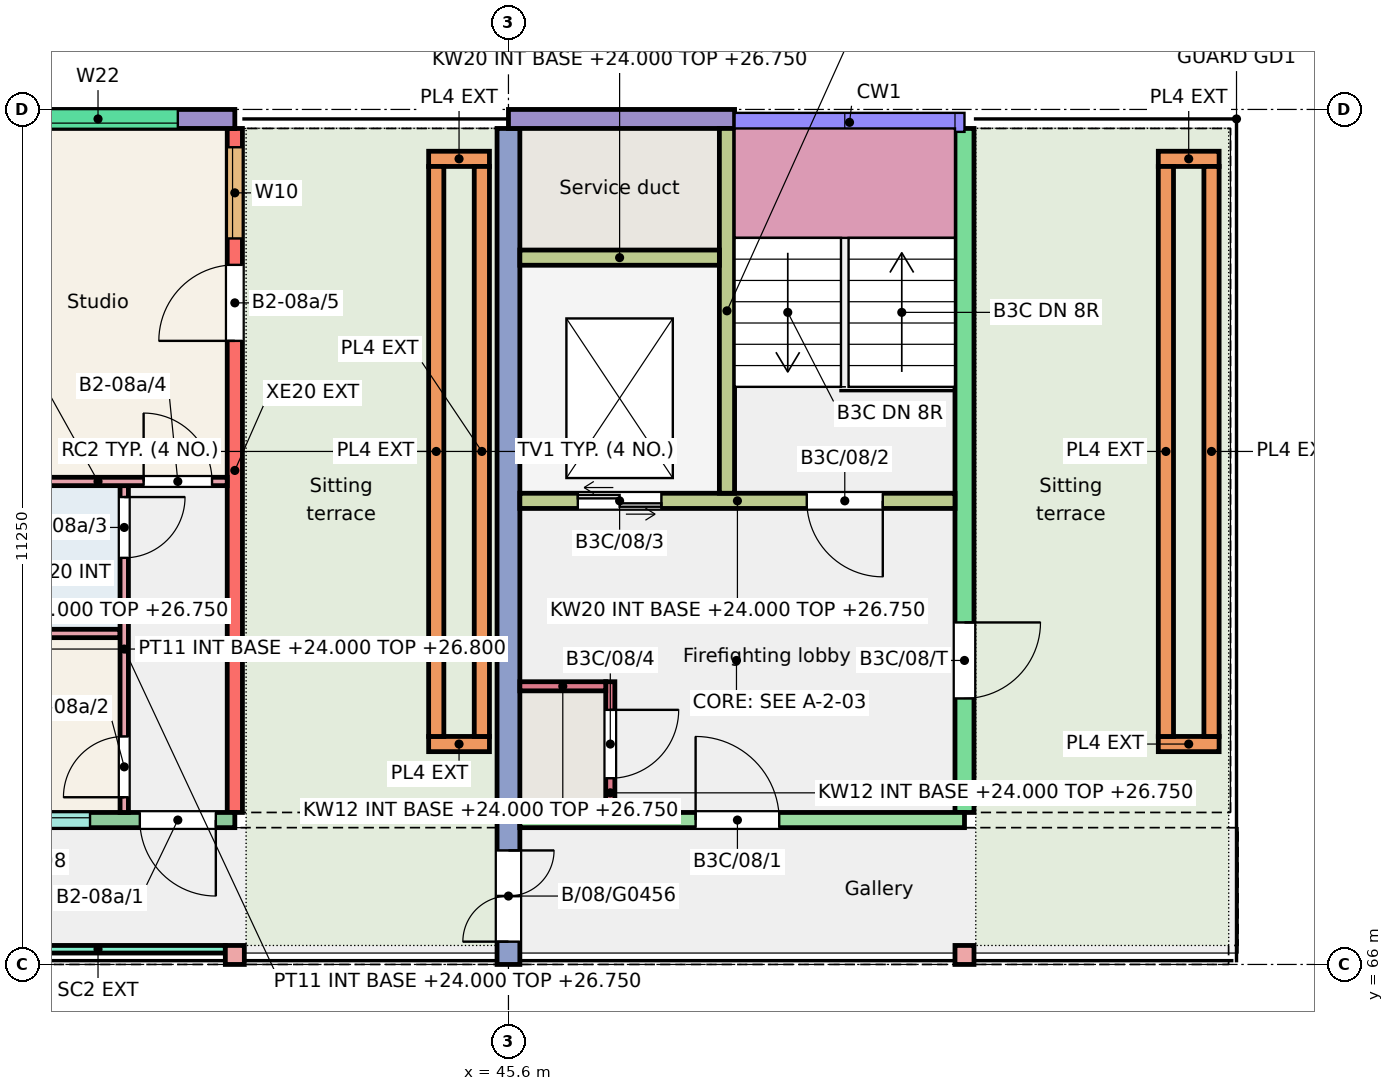
"""IFC4 building model, lengths in metres.
Left out: names, types, materials, properties, quantities, classifications, styles, units other than length and angle.
Written with IfcOpenShell. Run it as: python <this file> out.ifc"""

import sys

from ifc_helpers import new_model, si_unit, direction, frame, frame_2d, origin, origin_2d, place, context, subcontext, project, spatial, rectangle, extrude, element, fill, save


model = new_model("IFC4")
c1 = context("Model", 3, precision=1e-05, world=origin(), true_north=direction((0.0, 1.0)))
c2 = subcontext(c1, "Body", "Model", "MODEL_VIEW")
j1 = project(units=[si_unit("LENGTHUNIT", "METRE"), si_unit("PLANEANGLEUNIT", "RADIAN")], contexts=[c1])
p1 = place(None, origin())
s1 = spatial("IfcSite", under=j1, at=p1, CompositionType="ELEMENT")
p2 = place(p1, origin())
s2 = spatial("IfcBuilding", under=s1, at=p2, CompositionType="ELEMENT")
p3 = place(p2, frame((0.0, 0.0, 24.0)))
s3 = spatial("IfcBuildingStorey", under=s2, at=p3, CompositionType="ELEMENT", Elevation=24.0)
p4 = place(p3, frame((42.0, 68.0, 0.0), z_axis=(0.0, 0.0, 1.0), x_axis=(0.0, 1.0, 0.0)))
e1 = element("IfcWall", 1, at=p4, inside=s3, PredefinedType="SHEAR", context=c2, shape_type="SweptSolid", body=[
    extrude(rectangle(XDim=9.0, YDim=0.2, at=frame_2d((4.5, 0.0))), origin(), (0.0, 0.0, 1.0), 3.0),
])
p5 = place(p4, frame((7.552, 0.0, 0.9)))
e2 = element("IfcOpeningElement", 2, at=p5, cuts=e1, PredefinedType="OPENING", context=c2, shape_type="SweptSolid", body=[
    extrude(rectangle(XDim=1.2, YDim=1.5, at=frame_2d((0.6, 0.75))), frame((0.0, 0.11, 0.0), z_axis=(0.0, -1.0, 0.0), x_axis=(1.0, 0.0, 0.0)), (0.0, 0.0, 1.0), 0.22),
])
p6 = place(p4, frame((6.205, 0.0, 0.0)))
e3 = element("IfcOpeningElement", 3, at=p6, cuts=e1, PredefinedType="OPENING", context=c2, shape_type="SweptSolid", body=[
    extrude(rectangle(XDim=1.0, YDim=2.1, at=frame_2d((0.5, 1.05))), frame((0.0, 0.11, 0.0), z_axis=(0.0, -1.0, 0.0), x_axis=(1.0, 0.0, 0.0)), (0.0, 0.0, 1.0), 0.22),
])
p7 = place(p3, frame((45.6, 66.0, 0.0), z_axis=(0.0, 0.0, 1.0), x_axis=(0.0, 1.0, 0.0)))
e4 = element("IfcWall", 4, at=p7, inside=s3, PredefinedType="SHEAR", context=c2, shape_type="SweptSolid", body=[
    extrude(rectangle(XDim=11.0, YDim=0.3, at=frame_2d((5.5, 0.0))), origin(), (0.0, 0.0, 1.0), 3.0),
])
p8 = place(p7, frame((0.3, 0.0, 0.0)))
e5 = element("IfcOpeningElement", 5, at=p8, cuts=e4, PredefinedType="OPENING", context=c2, shape_type="SweptSolid", body=[
    extrude(rectangle(XDim=1.2, YDim=2.1, at=frame_2d((0.6, 1.05))), frame((0.0, 0.16, 0.0), z_axis=(0.0, -1.0, 0.0), x_axis=(1.0, 0.0, 0.0)), (0.0, 0.0, 1.0), 0.32),
])
p9 = place(p3, frame((51.6, 68.0, 0.0), z_axis=(0.0, 0.0, 1.0), x_axis=(0.0, 1.0, 0.0)))
e6 = element("IfcWall", 6, at=p9, inside=s3, PredefinedType="SHEAR", context=c2, shape_type="SweptSolid", body=[
    extrude(rectangle(XDim=9.0, YDim=0.25, at=frame_2d((4.5, 0.0))), origin(), (0.0, 0.0, 1.0), 3.0),
])
p10 = place(p9, frame((1.5, 0.0, 0.0)))
e7 = element("IfcOpeningElement", 7, at=p10, cuts=e6, PredefinedType="OPENING", context=c2, shape_type="SweptSolid", body=[
    extrude(rectangle(XDim=1.0, YDim=2.1, at=frame_2d((0.5, 1.05))), frame((0.0, 0.135, 0.0), z_axis=(0.0, -1.0, 0.0), x_axis=(1.0, 0.0, 0.0)), (0.0, 0.0, 1.0), 0.27),
])
p11 = place(p3, frame((38.4, 77.125, 0.0), z_axis=(0.0, 0.0, 1.0), x_axis=(1.0, 0.0, 0.0)))
e8 = element("IfcWall", 8, at=p11, inside=s3, PredefinedType="SOLIDWALL", context=c2, shape_type="SweptSolid", body=[
    extrude(rectangle(XDim=3.6, YDim=0.25, at=frame_2d((1.8, 0.0))), origin(), (0.0, 0.0, 1.0), 3.0),
])
p12 = place(p11, frame((0.75, 0.0, 1.2)))
e9 = element("IfcOpeningElement", 9, at=p12, cuts=e8, PredefinedType="OPENING", context=c2, shape_type="SweptSolid", body=[
    extrude(rectangle(XDim=2.1, YDim=1.2, at=frame_2d((1.05, 0.6))), frame((0.0, 0.135, 0.0), z_axis=(0.0, -1.0, 0.0), x_axis=(1.0, 0.0, 0.0)), (0.0, 0.0, 1.0), 0.27),
])
p13 = place(p3, frame((38.4, 67.9, 0.0), z_axis=(0.0, 0.0, 1.0), x_axis=(1.0, 0.0, 0.0)))
e10 = element("IfcWall", 10, at=p13, inside=s3, PredefinedType="SOLIDWALL", context=c2, shape_type="SweptSolid", body=[
    extrude(rectangle(XDim=3.6, YDim=0.2, at=frame_2d((1.8, 0.0))), origin(), (0.0, 0.0, 1.0), 3.0),
])
p14 = place(p13, frame((0.495, 0.0, 1.1)))
e11 = element("IfcOpeningElement", 11, at=p14, cuts=e10, PredefinedType="OPENING", context=c2, shape_type="SweptSolid", body=[
    extrude(rectangle(XDim=1.2, YDim=1.3, at=frame_2d((0.6, 0.65))), frame((0.0, 0.11, 0.0), z_axis=(0.0, -1.0, 0.0), x_axis=(1.0, 0.0, 0.0)), (0.0, 0.0, 1.0), 0.22),
])
p15 = place(p13, frame((2.35, 0.0, 0.0)))
e12 = element("IfcOpeningElement", 12, at=p15, cuts=e10, PredefinedType="OPENING", context=c2, shape_type="SweptSolid", body=[
    extrude(rectangle(XDim=1.0, YDim=2.1, at=frame_2d((0.5, 1.05))), frame((0.0, 0.11, 0.0), z_axis=(0.0, -1.0, 0.0), x_axis=(1.0, 0.0, 0.0)), (0.0, 0.0, 1.0), 0.22),
])
p16 = place(p3, frame((45.6, 77.125, 0.0), z_axis=(0.0, 0.0, 1.0), x_axis=(1.0, 0.0, 0.0)))
e13 = element("IfcWall", 13, at=p16, inside=s3, PredefinedType="SOLIDWALL", context=c2, shape_type="SweptSolid", body=[
    extrude(rectangle(XDim=2.975, YDim=0.25, at=frame_2d((1.487, 0.0))), origin(), (0.0, 0.0, 1.0), 3.0),
])
p17 = place(p3, frame((45.75, 67.9, 0.0), z_axis=(0.0, 0.0, 1.0), x_axis=(1.0, 0.0, 0.0)))
e14 = element("IfcWall", 14, at=p17, inside=s3, PredefinedType="SHEAR", context=c2, shape_type="SweptSolid", body=[
    extrude(rectangle(XDim=5.85, YDim=0.2, at=frame_2d((2.925, 0.0))), origin(), (0.0, 0.0, 1.0), 2.75),
])
p18 = place(p17, frame((2.312, 0.0, 0.0)))
e15 = element("IfcOpeningElement", 15, at=p18, cuts=e14, PredefinedType="OPENING", context=c2, shape_type="SweptSolid", body=[
    extrude(rectangle(XDim=1.1, YDim=2.1, at=frame_2d((0.55, 1.05))), frame((0.0, 0.11, 0.0), z_axis=(0.0, -1.0, 0.0), x_axis=(1.0, 0.0, 0.0)), (0.0, 0.0, 1.0), 0.22),
])
p19 = place(p3, frame((45.75, 72.1, 0.0), z_axis=(0.0, 0.0, 1.0), x_axis=(1.0, 0.0, 0.0)))
e16 = element("IfcWall", 16, at=p19, inside=s3, PredefinedType="SHEAR", context=c2, shape_type="SweptSolid", body=[
    extrude(rectangle(XDim=5.725, YDim=0.2, at=frame_2d((2.863, 0.0))), origin(), (0.0, 0.0, 1.0), 2.75),
])
p20 = place(p19, frame((3.775, 0.0, 0.0)))
e17 = element("IfcOpeningElement", 17, at=p20, cuts=e16, PredefinedType="OPENING", context=c2, shape_type="SweptSolid", body=[
    extrude(rectangle(XDim=1.0, YDim=2.1, at=frame_2d((0.5, 1.05))), frame((0.0, 0.11, 0.0), z_axis=(0.0, -1.0, 0.0), x_axis=(1.0, 0.0, 0.0)), (0.0, 0.0, 1.0), 0.22),
])
p21 = place(p19, frame((0.762, 0.0, 0.0)))
e18 = element("IfcOpeningElement", 18, at=p21, cuts=e16, PredefinedType="OPENING", context=c2, shape_type="SweptSolid", body=[
    extrude(rectangle(XDim=1.1, YDim=2.1, at=frame_2d((0.55, 1.05))), frame((0.0, 0.11, 0.0), z_axis=(0.0, -1.0, 0.0), x_axis=(1.0, 0.0, 0.0)), (0.0, 0.0, 1.0), 0.22),
])
p22 = place(p3, frame((48.475, 72.2, 0.0), z_axis=(0.0, 0.0, 1.0), x_axis=(0.0, 1.0, 0.0)))
e19 = element("IfcWall", 19, at=p22, inside=s3, PredefinedType="SHEAR", context=c2, shape_type="SweptSolid", body=[
    extrude(rectangle(XDim=4.8, YDim=0.2, at=frame_2d((2.4, 0.0))), origin(), (0.0, 0.0, 1.0), 2.75),
])
p23 = place(p3, frame((45.75, 75.3, 0.0), z_axis=(0.0, 0.0, 1.0), x_axis=(1.0, 0.0, 0.0)))
e20 = element("IfcWall", 20, at=p23, inside=s3, PredefinedType="SHEAR", context=c2, shape_type="SweptSolid", body=[
    extrude(rectangle(XDim=2.625, YDim=0.2, at=frame_2d((1.312, 0.0))), origin(), (0.0, 0.0, 1.0), 2.75),
])
p24 = place(p3, frame((46.94, 68.0, 0.0), z_axis=(0.0, 0.0, 1.0), x_axis=(0.0, 1.0, 0.0)))
e21 = element("IfcWall", 21, at=p24, inside=s3, PredefinedType="SHEAR", context=c2, shape_type="SweptSolid", body=[
    extrude(rectangle(XDim=1.72, YDim=0.12, at=frame_2d((0.86, 0.0))), origin(), (0.0, 0.0, 1.0), 2.75),
])
p25 = place(p24, frame((0.45, 0.0, 0.0)))
e22 = element("IfcOpeningElement", 22, at=p25, cuts=e21, PredefinedType="OPENING", context=c2, shape_type="SweptSolid", body=[
    extrude(rectangle(XDim=0.9, YDim=2.1, at=frame_2d((0.45, 1.05))), frame((0.0, 0.07, 0.0), z_axis=(0.0, -1.0, 0.0), x_axis=(1.0, 0.0, 0.0)), (0.0, 0.0, 1.0), 0.14),
])
p26 = place(p3, frame((45.75, 69.66, 0.0), z_axis=(0.0, 0.0, 1.0), x_axis=(1.0, 0.0, 0.0)))
e23 = element("IfcWall", 23, at=p26, inside=s3, PredefinedType="SHEAR", context=c2, shape_type="SweptSolid", body=[
    extrude(rectangle(XDim=1.13, YDim=0.12, at=frame_2d((0.565, 0.0))), origin(), (0.0, 0.0, 1.0), 2.75),
])
for number, where, z_axis, x_axis in (
    (24, (42.0, 66.125, 0.0), (0.0, 0.0, 1.0), (1.0, 0.0, 0.0)),
    (25, (51.6, 66.125, 0.0), (0.0, 0.0, 1.0), (1.0, 0.0, 0.0)),
):
    element("IfcColumn", number, at=place(p3, frame(where, z_axis=z_axis, x_axis=x_axis)), inside=s3, PredefinedType="COLUMN", context=c2, shape_type="SweptSolid", body=[
        extrude(rectangle(XDim=0.25, YDim=0.25, at=origin_2d()), origin(), (0.0, 0.0, 1.0), 3.0),
    ])
for number, where, z_axis, x_axis in (
    (26, (44.55, 68.9, 0.01), (0.0, 0.0, 1.0), (1.0, 0.0, 0.0)),
    (27, (44.55, 76.6, 0.01), (0.0, 0.0, 1.0), (1.0, 0.0, 0.0)),
):
    element("IfcWall", number, at=place(p3, frame(where, z_axis=z_axis, x_axis=x_axis)), inside=s3, PredefinedType="SOLIDWALL", context=c2, shape_type="SweptSolid", body=[
        extrude(rectangle(XDim=0.8, YDim=0.2, at=frame_2d((0.4, 0.0))), origin(), (0.0, 0.0, 1.0), 0.45),
    ])
for number, where, z_axis, x_axis in (
    (28, (44.65, 69.0, 0.01), (0.0, 0.0, 1.0), (0.0, 1.0, 0.0)),
    (29, (45.25, 69.0, 0.01), (0.0, 0.0, 1.0), (0.0, 1.0, 0.0)),
):
    element("IfcWall", number, at=place(p3, frame(where, z_axis=z_axis, x_axis=x_axis)), inside=s3, PredefinedType="SOLIDWALL", context=c2, shape_type="SweptSolid", body=[
        extrude(rectangle(XDim=7.5, YDim=0.2, at=frame_2d((3.75, 0.0))), origin(), (0.0, 0.0, 1.0), 0.45),
    ])
for number, where, z_axis, x_axis in (
    (30, (54.15, 68.9, 0.01), (0.0, 0.0, 1.0), (1.0, 0.0, 0.0)),
    (31, (54.15, 76.6, 0.01), (0.0, 0.0, 1.0), (1.0, 0.0, 0.0)),
):
    element("IfcWall", number, at=place(p3, frame(where, z_axis=z_axis, x_axis=x_axis)), inside=s3, PredefinedType="SOLIDWALL", context=c2, shape_type="SweptSolid", body=[
        extrude(rectangle(XDim=0.8, YDim=0.2, at=frame_2d((0.4, 0.0))), origin(), (0.0, 0.0, 1.0), 0.45),
    ])
for number, where, z_axis, x_axis in (
    (32, (54.25, 69.0, 0.01), (0.0, 0.0, 1.0), (0.0, 1.0, 0.0)),
    (33, (54.85, 69.0, 0.01), (0.0, 0.0, 1.0), (0.0, 1.0, 0.0)),
):
    element("IfcWall", number, at=place(p3, frame(where, z_axis=z_axis, x_axis=x_axis)), inside=s3, PredefinedType="SOLIDWALL", context=c2, shape_type="SweptSolid", body=[
        extrude(rectangle(XDim=7.5, YDim=0.2, at=frame_2d((3.75, 0.0))), origin(), (0.0, 0.0, 1.0), 0.45),
    ])
p27 = place(p3, frame((38.525, 66.2, 0.0), z_axis=(0.0, 0.0, 1.0), x_axis=(1.0, 0.0, 0.0)))
e34 = element("IfcWall", 34, at=p27, inside=s3, PredefinedType="SOLIDWALL", context=c2, shape_type="SweptSolid", body=[
    extrude(rectangle(XDim=3.35, YDim=0.1, at=frame_2d((1.675, 0.0))), origin(), (0.0, 0.0, 1.0), 2.45),
])
p28 = place(p3, frame((38.5, 70.355, 0.0), z_axis=(0.0, 0.0, 1.0), x_axis=(1.0, 0.0, 0.0)))
e35 = element("IfcWall", 35, at=p28, inside=s3, PredefinedType="PARTITIONING", context=c2, shape_type="SweptSolid", body=[
    extrude(rectangle(XDim=1.99, YDim=0.11, at=frame_2d((0.995, 0.0))), origin(), (0.0, 0.0, 1.0), 2.75),
])
p29 = place(p3, frame((40.545, 68.0, 0.0), z_axis=(0.0, 0.0, 1.0), x_axis=(0.0, 1.0, 0.0)))
e36 = element("IfcWall", 36, at=p29, inside=s3, PredefinedType="PARTITIONING", context=c2, shape_type="SweptSolid", body=[
    extrude(rectangle(XDim=4.3, YDim=0.11, at=frame_2d((2.15, 0.0))), origin(), (0.0, 0.0, 1.0), 2.75),
])
p30 = place(p29, frame((0.2, 0.0, 0.0)))
e37 = element("IfcOpeningElement", 37, at=p30, cuts=e36, PredefinedType="OPENING", context=c2, shape_type="SweptSolid", body=[
    extrude(rectangle(XDim=0.8, YDim=2.1, at=frame_2d((0.4, 1.05))), frame((0.0, 0.065, 0.0), z_axis=(0.0, -1.0, 0.0), x_axis=(1.0, 0.0, 0.0)), (0.0, 0.0, 1.0), 0.13),
])
p31 = place(p29, frame((3.35, 0.0, 0.0)))
e38 = element("IfcOpeningElement", 38, at=p31, cuts=e36, PredefinedType="OPENING", context=c2, shape_type="SweptSolid", body=[
    extrude(rectangle(XDim=0.8, YDim=2.1, at=frame_2d((0.4, 1.05))), frame((0.0, 0.065, 0.0), z_axis=(0.0, -1.0, 0.0), x_axis=(1.0, 0.0, 0.0)), (0.0, 0.0, 1.0), 0.13),
])
p32 = place(p3, frame((38.5, 72.355, 0.0), z_axis=(0.0, 0.0, 1.0), x_axis=(1.0, 0.0, 0.0)))
e39 = element("IfcWall", 39, at=p32, inside=s3, PredefinedType="PARTITIONING", context=c2, shape_type="SweptSolid", body=[
    extrude(rectangle(XDim=3.4, YDim=0.11, at=frame_2d((1.7, 0.0))), origin(), (0.0, 0.0, 1.0), 2.75),
])
p33 = place(p32, frame((2.3, 0.0, 0.0)))
e40 = element("IfcOpeningElement", 40, at=p33, cuts=e39, PredefinedType="OPENING", context=c2, shape_type="SweptSolid", body=[
    extrude(rectangle(XDim=0.9, YDim=2.1, at=frame_2d((0.45, 1.05))), frame((0.0, 0.065, 0.0), z_axis=(0.0, -1.0, 0.0), x_axis=(1.0, 0.0, 0.0)), (0.0, 0.0, 1.0), 0.13),
])
p34 = place(p14, origin())
e41 = element("IfcWindow", 41, at=p34, inside=s3, PartitioningType="SINGLE_PANEL", PredefinedType="WINDOW", context=c2, shape_type="SweptSolid", body=[
    extrude(rectangle(XDim=1.2, YDim=1.3, at=frame_2d((0.6, 0.65))), frame((0.0, 0.06, 0.0), z_axis=(0.0, -1.0, 0.0), x_axis=(1.0, 0.0, 0.0)), (0.0, 0.0, 1.0), 0.06),
])
fill(e11, e41)
p35 = place(p12, origin())
e42 = element("IfcWindow", 42, at=p35, inside=s3, PartitioningType="SINGLE_PANEL", PredefinedType="WINDOW", context=c2, shape_type="SweptSolid", body=[
    extrude(rectangle(XDim=2.1, YDim=1.2, at=frame_2d((1.05, 0.6))), frame((0.0, -0.025, 0.0), z_axis=(0.0, -1.0, 0.0), x_axis=(1.0, 0.0, 0.0)), (0.0, 0.0, 1.0), 0.06),
])
fill(e9, e42)
p36 = place(p5, origin())
e43 = element("IfcWindow", 43, at=p36, inside=s3, PartitioningType="SINGLE_PANEL", PredefinedType="WINDOW", context=c2, shape_type="SweptSolid", body=[
    extrude(rectangle(XDim=1.2, YDim=1.5, at=frame_2d((0.6, 0.75))), frame((0.0, 0.06, 0.0), z_axis=(0.0, -1.0, 0.0), x_axis=(1.0, 0.0, 0.0)), (0.0, 0.0, 1.0), 0.06),
])
fill(e2, e43)
p37 = place(p15, origin())
e44 = element("IfcDoor", 44, at=p37, inside=s3, OperationType="SINGLE_SWING_RIGHT", PredefinedType="DOOR", context=c2, shape_type="SweptSolid", body=[
    extrude(rectangle(XDim=1.0, YDim=2.1, at=frame_2d((0.5, 1.05))), frame((0.0, 0.025, 0.0), z_axis=(0.0, -1.0, 0.0), x_axis=(1.0, 0.0, 0.0)), (0.0, 0.0, 1.0), 0.05),
])
fill(e12, e44)
p38 = place(p30, origin())
e45 = element("IfcDoor", 45, at=p38, inside=s3, OperationType="SINGLE_SWING_LEFT", PredefinedType="DOOR", context=c2, shape_type="SweptSolid", body=[
    extrude(rectangle(XDim=0.8, YDim=2.1, at=frame_2d((0.4, 1.05))), frame((0.0, 0.025, 0.0), z_axis=(0.0, -1.0, 0.0), x_axis=(1.0, 0.0, 0.0)), (0.0, 0.0, 1.0), 0.05),
])
fill(e37, e45)
p39 = place(p31, origin())
e46 = element("IfcDoor", 46, at=p39, inside=s3, OperationType="SINGLE_SWING_RIGHT", PredefinedType="DOOR", context=c2, shape_type="SweptSolid", body=[
    extrude(rectangle(XDim=0.8, YDim=2.1, at=frame_2d((0.4, 1.05))), frame((0.0, 0.025, 0.0), z_axis=(0.0, -1.0, 0.0), x_axis=(1.0, 0.0, 0.0)), (0.0, 0.0, 1.0), 0.05),
])
fill(e38, e46)
p40 = place(p33, origin())
e47 = element("IfcDoor", 47, at=p40, inside=s3, OperationType="SINGLE_SWING_LEFT", PredefinedType="DOOR", context=c2, shape_type="SweptSolid", body=[
    extrude(rectangle(XDim=0.9, YDim=2.1, at=frame_2d((0.45, 1.05))), frame((0.0, 0.025, 0.0), z_axis=(0.0, -1.0, 0.0), x_axis=(1.0, 0.0, 0.0)), (0.0, 0.0, 1.0), 0.05),
])
fill(e40, e47)
p41 = place(p6, origin())
e48 = element("IfcDoor", 48, at=p41, inside=s3, OperationType="SINGLE_SWING_LEFT", PredefinedType="DOOR", context=c2, shape_type="SweptSolid", body=[
    extrude(rectangle(XDim=1.0, YDim=2.1, at=frame_2d((0.5, 1.05))), frame((0.0, 0.025, 0.0), z_axis=(0.0, -1.0, 0.0), x_axis=(1.0, 0.0, 0.0)), (0.0, 0.0, 1.0), 0.05),
])
fill(e3, e48)
p42 = place(p18, origin())
e49 = element("IfcDoor", 49, at=p42, inside=s3, OperationType="SINGLE_SWING_LEFT", PredefinedType="DOOR", context=c2, shape_type="SweptSolid", body=[
    extrude(rectangle(XDim=1.1, YDim=2.1, at=frame_2d((0.55, 1.05))), frame((0.0, 0.025, 0.0), z_axis=(0.0, -1.0, 0.0), x_axis=(1.0, 0.0, 0.0)), (0.0, 0.0, 1.0), 0.05),
])
fill(e15, e49)
p43 = place(p20, origin())
e50 = element("IfcDoor", 50, at=p43, inside=s3, OperationType="SINGLE_SWING_RIGHT", PredefinedType="DOOR", context=c2, shape_type="SweptSolid", body=[
    extrude(rectangle(XDim=1.0, YDim=2.1, at=frame_2d((0.5, 1.05))), frame((0.0, 0.025, 0.0), z_axis=(0.0, -1.0, 0.0), x_axis=(1.0, 0.0, 0.0)), (0.0, 0.0, 1.0), 0.05),
])
fill(e17, e50)
p44 = place(p21, origin())
e51 = element("IfcDoor", 51, at=p44, inside=s3, OperationType="DOUBLE_DOOR_SLIDING", PredefinedType="DOOR", context=c2, shape_type="SweptSolid", body=[
    extrude(rectangle(XDim=1.1, YDim=2.1, at=frame_2d((0.55, 1.05))), frame((0.0, 0.025, 0.0), z_axis=(0.0, -1.0, 0.0), x_axis=(1.0, 0.0, 0.0)), (0.0, 0.0, 1.0), 0.05),
])
fill(e18, e51)
p45 = place(p25, origin())
e52 = element("IfcDoor", 52, at=p45, inside=s3, OperationType="SINGLE_SWING_RIGHT", PredefinedType="DOOR", context=c2, shape_type="SweptSolid", body=[
    extrude(rectangle(XDim=0.9, YDim=2.1, at=frame_2d((0.45, 1.05))), frame((0.0, 0.025, 0.0), z_axis=(0.0, -1.0, 0.0), x_axis=(1.0, 0.0, 0.0)), (0.0, 0.0, 1.0), 0.05),
])
fill(e22, e52)
p46 = place(p10, origin())
e53 = element("IfcDoor", 53, at=p46, inside=s3, OperationType="SINGLE_SWING_RIGHT", PredefinedType="DOOR", context=c2, shape_type="SweptSolid", body=[
    extrude(rectangle(XDim=1.0, YDim=2.1, at=frame_2d((0.5, 1.05))), frame((0.0, 0.025, 0.0), z_axis=(0.0, -1.0, 0.0), x_axis=(1.0, 0.0, 0.0)), (0.0, 0.0, 1.0), 0.05),
])
fill(e7, e53)
p47 = place(p8, origin())
e54 = element("IfcDoor", 54, at=p47, inside=s3, OperationType="DOUBLE_DOOR_SINGLE_SWING", PredefinedType="DOOR", context=c2, shape_type="SweptSolid", body=[
    extrude(rectangle(XDim=1.2, YDim=2.1, at=frame_2d((0.6, 1.05))), frame((0.0, 0.025, 0.0), z_axis=(0.0, -1.0, 0.0), x_axis=(1.0, 0.0, 0.0)), (0.0, 0.0, 1.0), 0.05),
])
fill(e5, e54)
save(model, sys.argv[1])
